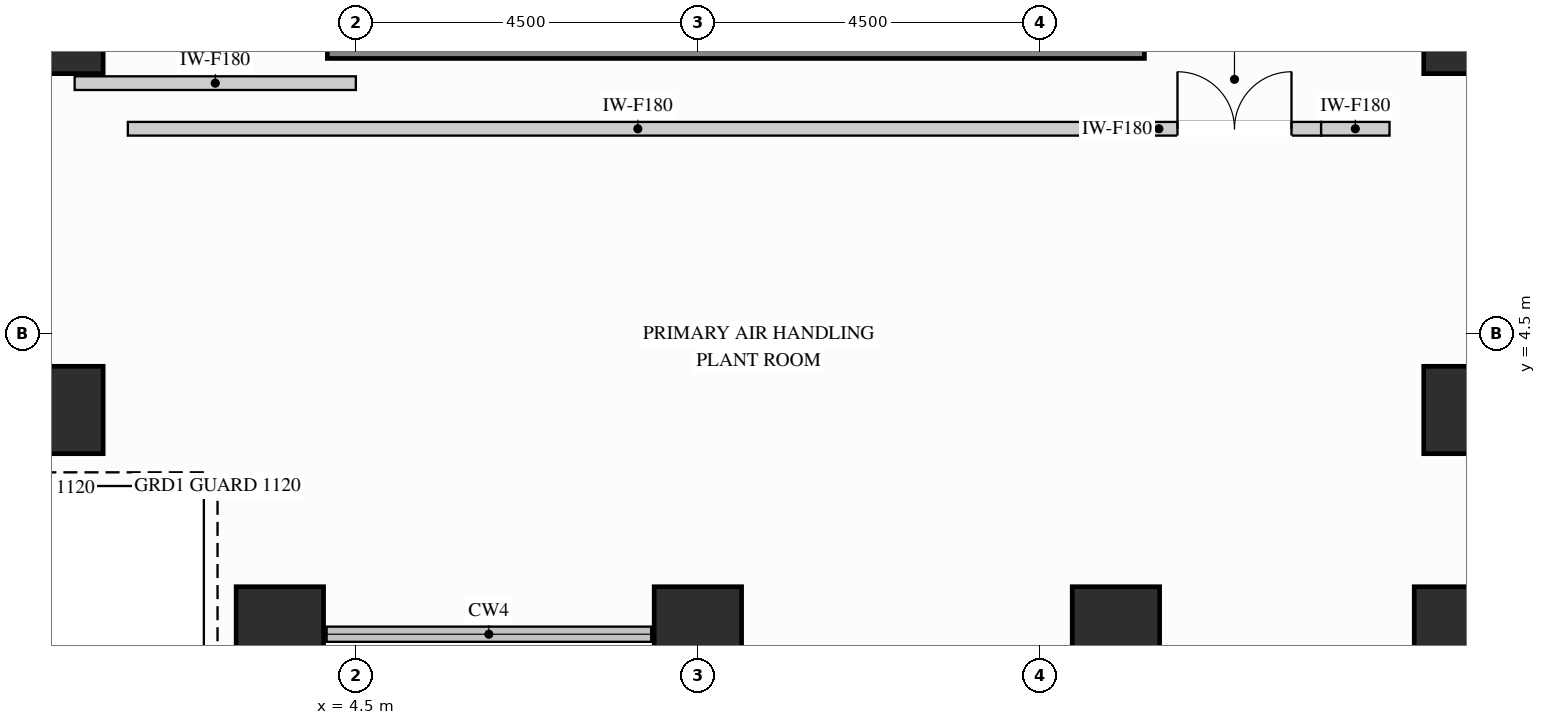
"""IFC4 building model, lengths in metres.
Left out: names, types, materials, properties, quantities, classifications, styles, units other than length and angle.
Written with IfcOpenShell. Run it as: python <this file> out.ifc"""

import sys

from ifc_helpers import new_model, si_unit, direction, frame, frame_2d, origin, origin_2d, place, context, subcontext, project, spatial, rectangle, extrude, source, transform, mapped, element, fill, save


model = new_model("IFC4")
c1 = context("Model", 3, precision=1e-05, world=origin(), true_north=direction((0.0, 1.0)))
c2 = subcontext(c1, "Body", "Model", "MODEL_VIEW")
j1 = project(units=[si_unit("LENGTHUNIT", "METRE"), si_unit("PLANEANGLEUNIT", "RADIAN")], contexts=[c1])
p1 = place(None, origin())
s1 = spatial("IfcSite", under=j1, at=p1, CompositionType="ELEMENT")
p2 = place(p1, origin())
s2 = spatial("IfcBuilding", under=s1, at=p2, CompositionType="ELEMENT")
p3 = place(p2, frame((0.0, 0.0, 138.6)))
s3 = spatial("IfcBuildingStorey", under=s2, at=p3, CompositionType="ELEMENT", Elevation=138.6)
m1 = source(origin(), c2, "Body", "SweptSolid", [
    extrude(rectangle(XDim=0.9, YDim=1.15, at=origin_2d()), origin(), (0.0, 0.0, 1.0), 4.26),
])
for number, where, z_axis, x_axis in (
    (1, (19.0, 3.5, 0.0), (0.0, 0.0, 1.0), (1.0, 0.0, 0.0)),
    (2, (19.0, 8.5, 0.0), (0.0, 0.0, 1.0), (1.0, 0.0, 0.0)),
):
    element("IfcColumn", number, at=place(p3, frame(where, z_axis=z_axis, x_axis=x_axis)), inside=s3, PredefinedType="COLUMN", context=c2, shape_type="MappedRepresentation", body=[
        mapped(m1, transform((0.0, 0.0, 0.0), x_axis=(1.0, 0.0, 0.0), y_axis=(0.0, 1.0, 0.0), z_axis=(0.0, 0.0, 1.0))),
    ])
m2 = source(origin(), c2, "Body", "SweptSolid", [
    extrude(rectangle(XDim=1.15, YDim=1.15, at=origin_2d()), origin(), (0.0, 0.0, 1.0), 4.26),
])
for number, where, z_axis, x_axis in (
    (3, (14.5, 0.6, 0.0), (0.0, 0.0, 1.0), (1.0, 0.0, 0.0)),
    (4, (19.0, 0.6, 0.0), (0.0, 0.0, 1.0), (1.0, 0.0, 0.0)),
    (5, (3.5, 0.6, 0.0), (0.0, 0.0, 1.0), (1.0, 0.0, 0.0)),
    (6, (9.0, 0.6, 0.0), (0.0, 0.0, 1.0), (1.0, 0.0, 0.0)),
    (7, (0.6, 3.5, 0.0), (0.0, 0.0, 1.0), (1.0, 0.0, 0.0)),
    (8, (0.6, 8.5, 0.0), (0.0, 0.0, 1.0), (1.0, 0.0, 0.0)),
):
    element("IfcColumn", number, at=place(p3, frame(where, z_axis=z_axis, x_axis=x_axis)), inside=s3, PredefinedType="COLUMN", context=c2, shape_type="MappedRepresentation", body=[
        mapped(m2, transform((0.0, 0.0, 0.0), x_axis=(1.0, 0.0, 0.0), y_axis=(0.0, 1.0, 0.0), z_axis=(0.0, 0.0, 1.0))),
    ])
m3 = source(origin(), c2, "Body", "SweptSolid", [
    extrude(rectangle(XDim=10.75, YDim=0.75, at=frame_2d((5.375, 0.0))), origin(), (0.0, 0.0, 1.0), 4.26),
])
p4 = place(p3, frame((4.125, 8.5, 0.0), z_axis=(0.0, 0.0, 1.0), x_axis=(1.0, 0.0, 0.0)))
e9 = element("IfcWall", 9, at=p4, inside=s3, PredefinedType="SHEAR", context=c2, shape_type="MappedRepresentation", body=[
    mapped(m3, transform((0.0, 0.0, 0.0), x_axis=(1.0, 0.0, 0.0), y_axis=(0.0, 1.0, 0.0), z_axis=(0.0, 0.0, 1.0))),
])
p5 = place(p3, frame((14.92, 7.2, 0.0), z_axis=(0.0, 0.0, 1.0), x_axis=(1.0, 0.0, 0.0)))
e10 = element("IfcWall", 10, at=p5, inside=s3, PredefinedType="PARTITIONING", context=c2, shape_type="SweptSolid", body=[
    extrude(rectangle(XDim=2.28, YDim=0.18, at=frame_2d((1.14, 0.0))), origin(), (0.0, 0.0, 1.0), 4.245),
])
p6 = place(p5, frame((0.39, 0.0, 0.0)))
e11 = element("IfcOpeningElement", 11, at=p6, cuts=e10, PredefinedType="OPENING", context=c2, shape_type="SweptSolid", body=[
    extrude(rectangle(XDim=1.5, YDim=2.2, at=frame_2d((0.75, 1.1))), frame((0.0, 0.1, 0.0), z_axis=(0.0, -1.0, 0.0), x_axis=(1.0, 0.0, 0.0)), (0.0, 0.0, 1.0), 0.2),
])
m4 = source(origin(), c2, "Body", "SweptSolid", [
    extrude(rectangle(XDim=13.42, YDim=0.18, at=frame_2d((6.71, 0.0))), origin(), (0.0, 0.0, 1.0), 4.245),
])
p7 = place(p3, frame((1.5, 7.2, 0.0), z_axis=(0.0, 0.0, 1.0), x_axis=(1.0, 0.0, 0.0)))
e12 = element("IfcWall", 12, at=p7, inside=s3, PredefinedType="PARTITIONING", context=c2, shape_type="MappedRepresentation", body=[
    mapped(m4, transform((0.0, 0.0, 0.0), x_axis=(1.0, 0.0, 0.0), y_axis=(0.0, 1.0, 0.0), z_axis=(0.0, 0.0, 1.0))),
])
m5 = source(origin(), c2, "Body", "SweptSolid", [
    extrude(rectangle(XDim=0.9, YDim=0.18, at=frame_2d((0.45, 0.0))), origin(), (0.0, 0.0, 1.0), 4.245),
])
p8 = place(p3, frame((17.2, 7.2, 0.0), z_axis=(0.0, 0.0, 1.0), x_axis=(1.0, 0.0, 0.0)))
e13 = element("IfcWall", 13, at=p8, inside=s3, PredefinedType="PARTITIONING", context=c2, shape_type="MappedRepresentation", body=[
    mapped(m5, transform((0.0, 0.0, 0.0), x_axis=(1.0, 0.0, 0.0), y_axis=(0.0, 1.0, 0.0), z_axis=(0.0, 0.0, 1.0))),
])
m6 = source(origin(), c2, "Body", "SweptSolid", [
    extrude(rectangle(XDim=3.7, YDim=0.18, at=frame_2d((1.85, 0.0))), origin(), (0.0, 0.0, 1.0), 3.708),
])
p9 = place(p3, frame((0.8, 7.8, 0.0), z_axis=(0.0, 0.0, 1.0), x_axis=(1.0, 0.0, 0.0)))
e14 = element("IfcWall", 14, at=p9, inside=s3, PredefinedType="PARTITIONING", context=c2, shape_type="MappedRepresentation", body=[
    mapped(m6, transform((0.0, 0.0, 0.0), x_axis=(1.0, 0.0, 0.0), y_axis=(0.0, 1.0, 0.0), z_axis=(0.0, 0.0, 1.0))),
])
m7 = source(origin(), c2, "Body", "SweptSolid", [
    extrude(rectangle(XDim=1.5, YDim=2.2, at=frame_2d((0.75, 1.1))), frame((0.0, 0.025, 0.0), z_axis=(0.0, -1.0, 0.0), x_axis=(1.0, 0.0, 0.0)), (0.0, 0.0, 1.0), 0.05),
])
p10 = place(p6, origin())
e15 = element("IfcDoor", 15, at=p10, inside=s3, OperationType="DOUBLE_DOOR_SINGLE_SWING", PredefinedType="DOOR", context=c2, shape_type="MappedRepresentation", body=[
    mapped(m7, transform((0.0, 0.0, 0.0), x_axis=(1.0, 0.0, 0.0), y_axis=(0.0, 1.0, 0.0), z_axis=(0.0, 0.0, 1.0))),
])
fill(e11, e15)
save(model, sys.argv[1])
